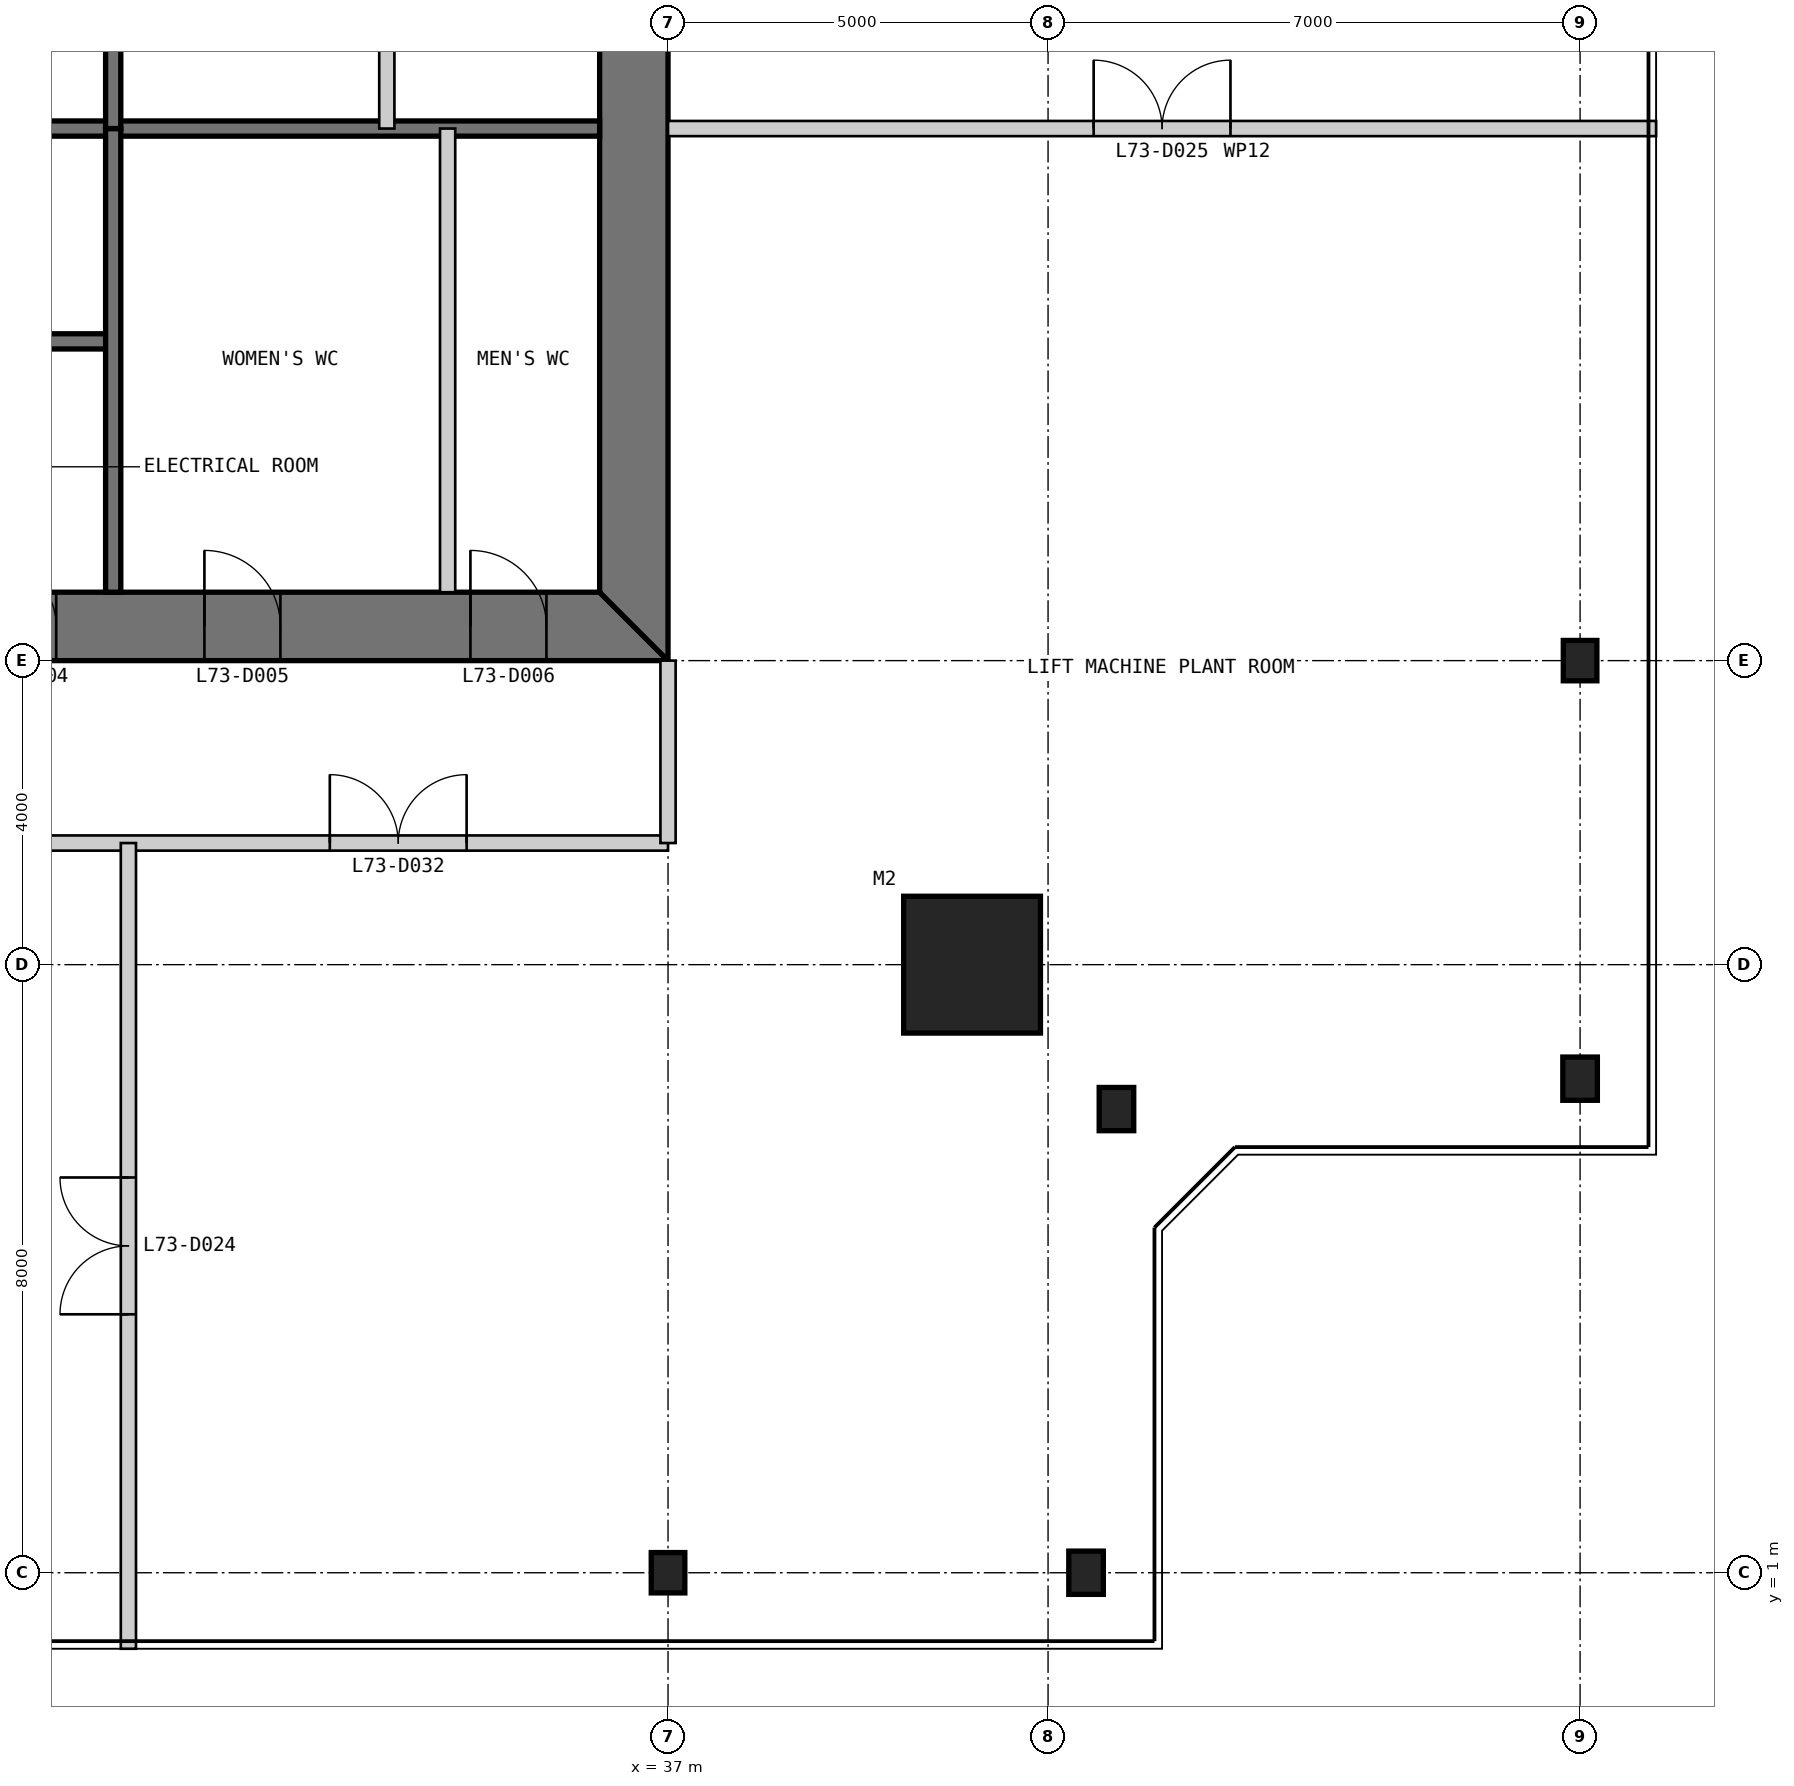
"""IFC4 building model, lengths in metres.
Left out: names, types, materials, properties, quantities, classifications, styles, units other than length and angle.
Written with IfcOpenShell. Run it as: python <this file> out.ifc"""

import sys

from ifc_helpers import new_model, si_unit, direction, frame, frame_2d, origin, origin_2d, place, context, subcontext, project, spatial, polyline, rectangle, i_section, outline, extrude, element, fill, save


model = new_model("IFC4")
c1 = context("Model", 3, precision=1e-05, world=origin(), true_north=direction((0.0, 1.0)))
c2 = subcontext(c1, "Body", "Model", "MODEL_VIEW")
j1 = project(units=[si_unit("LENGTHUNIT", "METRE"), si_unit("PLANEANGLEUNIT", "RADIAN")], contexts=[c1])
p1 = place(None, origin())
s1 = spatial("IfcSite", under=j1, at=p1, CompositionType="ELEMENT")
p2 = place(p1, origin())
s2 = spatial("IfcBuilding", under=s1, at=p2, CompositionType="ELEMENT")
p3 = place(p2, frame((0.0, 0.0, 301.8)))
s3 = spatial("IfcBuildingStorey", under=s2, at=p3, CompositionType="ELEMENT", Elevation=301.8)
p4 = place(p3, frame((41.0, 9.0, 0.0), z_axis=(0.0, 0.0, 1.0), x_axis=(1.0, 0.0, 0.0)))
e1 = element("IfcColumn", 1, at=p4, inside=s3, PredefinedType="COLUMN", context=c2, shape_type="SweptSolid", body=[
    extrude(rectangle(XDim=1.8, YDim=1.8, at=origin_2d()), origin(), (0.0, 0.0, 1.0), 6.0),
])
p5 = place(p3, frame((37.0, 1.0, 0.0), z_axis=(0.0, 0.0, 1.0), x_axis=(1.0, 0.0, 0.0)))
e2 = element("IfcColumn", 2, at=p5, inside=s3, PredefinedType="COLUMN", context=c2, shape_type="SweptSolid", body=[
    extrude(i_section(OverallWidth=0.442, OverallDepth=0.531, WebThickness=0.066, FlangeThickness=0.106, at=origin_2d()), origin(), (0.0, 0.0, 1.0), 6.0),
])
for number, where, z_axis, x_axis in (
    (3, (42.5, 1.0, 0.0), (0.0, 0.0, 1.0), (1.0, 0.0, 0.0)),
    (4, (42.9, 7.1, 0.0), (0.0, 0.0, 1.0), (1.0, 0.0, 0.0)),
    (5, (49.0, 7.5, 0.0), (0.0, 0.0, 1.0), (1.0, 0.0, 0.0)),
):
    element("IfcColumn", number, at=place(p3, frame(where, z_axis=z_axis, x_axis=x_axis)), inside=s3, PredefinedType="COLUMN", context=c2, shape_type="SweptSolid", body=[
        extrude(i_section(OverallWidth=0.455, OverallDepth=0.569, WebThickness=0.078, FlangeThickness=0.125, at=origin_2d()), origin(), (0.0, 0.0, 1.0), 6.0),
    ])
p6 = place(p3, frame((49.0, 13.0, 0.0), z_axis=(0.0, 0.0, 1.0), x_axis=(1.0, 0.0, 0.0)))
e6 = element("IfcColumn", 6, at=p6, inside=s3, PredefinedType="COLUMN", context=c2, shape_type="SweptSolid", body=[
    extrude(i_section(OverallWidth=0.442, OverallDepth=0.531, WebThickness=0.066, FlangeThickness=0.106, at=origin_2d()), origin(), (0.0, 0.0, 1.0), 6.0),
])
p7 = place(p3, frame((13.0, 13.45, 0.0), z_axis=(0.0, 0.0, 1.0), x_axis=(1.0, 0.0, 0.0)))
e7 = element("IfcWall", 7, at=p7, inside=s3, PredefinedType="SHEAR", context=c2, shape_type="SweptSolid", body=[
    extrude(outline(polyline([(0.0, -0.45), (24.0, -0.45), (23.1, 0.45), (0.9, 0.45), (0.0, -0.45)])), origin(), (0.0, 0.0, 1.0), 6.0),
])
p8 = place(p7, frame((4.9, 0.0, 0.0)))
e8 = element("IfcOpeningElement", 8, at=p8, cuts=e7, PredefinedType="OPENING", context=c2, shape_type="SweptSolid", body=[
    extrude(rectangle(XDim=1.0, YDim=2.2, at=frame_2d((0.5, 1.1))), frame((0.0, 0.46, 0.0), z_axis=(0.0, -1.0, 0.0), x_axis=(1.0, 0.0, 0.0)), (0.0, 0.0, 1.0), 0.92),
])
p9 = place(p7, frame((8.9, 0.0, 0.0)))
e9 = element("IfcOpeningElement", 9, at=p9, cuts=e7, PredefinedType="OPENING", context=c2, shape_type="SweptSolid", body=[
    extrude(rectangle(XDim=1.1, YDim=2.2, at=frame_2d((0.55, 1.1))), frame((0.0, 0.46, 0.0), z_axis=(0.0, -1.0, 0.0), x_axis=(1.0, 0.0, 0.0)), (0.0, 0.0, 1.0), 0.92),
])
p10 = place(p7, frame((15.05, 0.0, 0.0)))
e10 = element("IfcOpeningElement", 10, at=p10, cuts=e7, PredefinedType="OPENING", context=c2, shape_type="SweptSolid", body=[
    extrude(rectangle(XDim=0.9, YDim=2.2, at=frame_2d((0.45, 1.1))), frame((0.0, 0.46, 0.0), z_axis=(0.0, -1.0, 0.0), x_axis=(1.0, 0.0, 0.0)), (0.0, 0.0, 1.0), 0.92),
])
p11 = place(p7, frame((17.9, 0.0, 0.0)))
e11 = element("IfcOpeningElement", 11, at=p11, cuts=e7, PredefinedType="OPENING", context=c2, shape_type="SweptSolid", body=[
    extrude(rectangle(XDim=1.0, YDim=2.2, at=frame_2d((0.5, 1.1))), frame((0.0, 0.46, 0.0), z_axis=(0.0, -1.0, 0.0), x_axis=(1.0, 0.0, 0.0)), (0.0, 0.0, 1.0), 0.92),
])
p12 = place(p7, frame((21.4, 0.0, 0.0)))
e12 = element("IfcOpeningElement", 12, at=p12, cuts=e7, PredefinedType="OPENING", context=c2, shape_type="SweptSolid", body=[
    extrude(rectangle(XDim=1.0, YDim=2.2, at=frame_2d((0.5, 1.1))), frame((0.0, 0.46, 0.0), z_axis=(0.0, -1.0, 0.0), x_axis=(1.0, 0.0, 0.0)), (0.0, 0.0, 1.0), 0.92),
])
p13 = place(p3, frame((36.55, 13.9, 0.0), z_axis=(0.0, 0.0, 1.0), x_axis=(0.0, 1.0, 0.0)))
e13 = element("IfcWall", 13, at=p13, inside=s3, PredefinedType="SHEAR", context=c2, shape_type="SweptSolid", body=[
    extrude(outline(polyline([(-0.9, -0.45), (23.1, -0.45), (22.2, 0.45), (0.0, 0.45), (-0.9, -0.45)])), origin(), (0.0, 0.0, 1.0), 6.0),
])
p14 = place(p13, frame((20.2, 0.0, 0.0)))
e14 = element("IfcOpeningElement", 14, at=p14, cuts=e13, PredefinedType="OPENING", context=c2, shape_type="SweptSolid", body=[
    extrude(rectangle(XDim=1.0, YDim=2.2, at=frame_2d((0.5, 1.1))), frame((0.0, 0.46, 0.0), z_axis=(0.0, -1.0, 0.0), x_axis=(1.0, 0.0, 0.0)), (0.0, 0.0, 1.0), 0.92),
])
p15 = place(p13, frame((17.25, 0.0, 0.0)))
e15 = element("IfcOpeningElement", 15, at=p15, cuts=e13, PredefinedType="OPENING", context=c2, shape_type="SweptSolid", body=[
    extrude(rectangle(XDim=0.9, YDim=2.2, at=frame_2d((0.45, 1.1))), frame((0.0, 0.46, 0.0), z_axis=(0.0, -1.0, 0.0), x_axis=(1.0, 0.0, 0.0)), (0.0, 0.0, 1.0), 0.92),
])
p16 = place(p3, frame((20.3, 17.2, 0.0), z_axis=(0.0, 0.0, 1.0), x_axis=(1.0, 0.0, 0.0)))
e16 = element("IfcWall", 16, at=p16, inside=s3, PredefinedType="SOLIDWALL", context=c2, shape_type="SweptSolid", body=[
    extrude(rectangle(XDim=9.4, YDim=0.2, at=frame_2d((4.7, 0.0))), origin(), (0.0, 0.0, 1.0), 5.8),
])
p17 = place(p16, frame((0.25, 0.0, 0.0)))
e17 = element("IfcOpeningElement", 17, at=p17, cuts=e16, PredefinedType="OPENING", context=c2, shape_type="SweptSolid", body=[
    extrude(rectangle(XDim=1.0, YDim=2.2, at=frame_2d((0.5, 1.1))), frame((0.0, 0.11, 0.0), z_axis=(0.0, -1.0, 0.0), x_axis=(1.0, 0.0, 0.0)), (0.0, 0.0, 1.0), 0.22),
])
p18 = place(p3, frame((20.3, 20.0, 0.0), z_axis=(0.0, 0.0, 1.0), x_axis=(1.0, 0.0, 0.0)))
e18 = element("IfcWall", 18, at=p18, inside=s3, PredefinedType="SOLIDWALL", context=c2, shape_type="SweptSolid", body=[
    extrude(rectangle(XDim=15.8, YDim=0.2, at=frame_2d((7.9, 0.0))), origin(), (0.0, 0.0, 1.0), 5.8),
])
p19 = place(p3, frame((29.7, 13.9, 0.0), z_axis=(0.0, 0.0, 1.0), x_axis=(0.0, 1.0, 0.0)))
e19 = element("IfcWall", 19, at=p19, inside=s3, PredefinedType="SOLIDWALL", context=c2, shape_type="SweptSolid", body=[
    extrude(rectangle(XDim=6.1, YDim=0.2, at=frame_2d((3.05, 0.0))), origin(), (0.0, 0.0, 1.0), 5.8),
])
p20 = place(p3, frame((34.1, 13.9, 0.0), z_axis=(0.0, 0.0, 1.0), x_axis=(0.0, 1.0, 0.0)))
e20 = element("IfcWall", 20, at=p20, inside=s3, PredefinedType="PARTITIONING", context=c2, shape_type="SweptSolid", body=[
    extrude(rectangle(XDim=6.1, YDim=0.2, at=frame_2d((3.05, 0.0))), origin(), (0.0, 0.0, 1.0), 5.8),
])
p21 = place(p3, frame((33.3, 36.1, 0.0), z_axis=(0.0, 0.0, 1.0), x_axis=(0.0, -1.0, 0.0)))
e21 = element("IfcWall", 21, at=p21, inside=s3, PredefinedType="PARTITIONING", context=c2, shape_type="SweptSolid", body=[
    extrude(rectangle(XDim=16.1, YDim=0.2, at=frame_2d((8.05, 0.0))), origin(), (0.0, 0.0, 1.0), 5.8),
])
p22 = place(p3, frame((29.7, 36.1, 0.0), z_axis=(0.0, 0.0, 1.0), x_axis=(0.0, -1.0, 0.0)))
e22 = element("IfcWall", 22, at=p22, inside=s3, PredefinedType="SOLIDWALL", context=c2, shape_type="SweptSolid", body=[
    extrude(rectangle(XDim=16.1, YDim=0.2, at=frame_2d((8.05, 0.0))), origin(), (0.0, 0.0, 1.0), 5.8),
])
p23 = place(p22, frame((6.4, 0.0, 0.0)))
e23 = element("IfcOpeningElement", 23, at=p23, cuts=e22, PredefinedType="OPENING", context=c2, shape_type="SweptSolid", body=[
    extrude(rectangle(XDim=0.9, YDim=2.2, at=frame_2d((0.45, 1.1))), frame((0.0, 0.11, 0.0), z_axis=(0.0, -1.0, 0.0), x_axis=(1.0, 0.0, 0.0)), (0.0, 0.0, 1.0), 0.22),
])
p24 = place(p22, frame((11.4, 0.0, 0.0)))
e24 = element("IfcOpeningElement", 24, at=p24, cuts=e22, PredefinedType="OPENING", context=c2, shape_type="SweptSolid", body=[
    extrude(rectangle(XDim=0.9, YDim=2.2, at=frame_2d((0.45, 1.1))), frame((0.0, 0.11, 0.0), z_axis=(0.0, -1.0, 0.0), x_axis=(1.0, 0.0, 0.0)), (0.0, 0.0, 1.0), 0.22),
])
p25 = place(p3, frame((13.0, 10.6, 0.0), z_axis=(0.0, 0.0, 1.0), x_axis=(1.0, 0.0, 0.0)))
e25 = element("IfcWall", 25, at=p25, inside=s3, PredefinedType="PARTITIONING", context=c2, shape_type="SweptSolid", body=[
    extrude(rectangle(XDim=24.0, YDim=0.2, at=frame_2d((12.0, 0.0))), origin(), (0.0, 0.0, 1.0), 5.8),
])
p26 = place(p25, frame((2.8, 0.0, 0.0)))
e26 = element("IfcOpeningElement", 26, at=p26, cuts=e25, PredefinedType="OPENING", context=c2, shape_type="SweptSolid", body=[
    extrude(rectangle(XDim=1.8, YDim=2.4, at=frame_2d((0.9, 1.2))), frame((0.0, 0.11, 0.0), z_axis=(0.0, -1.0, 0.0), x_axis=(1.0, 0.0, 0.0)), (0.0, 0.0, 1.0), 0.22),
])
p27 = place(p25, frame((11.25, 0.0, 0.0)))
e27 = element("IfcOpeningElement", 27, at=p27, cuts=e25, PredefinedType="OPENING", context=c2, shape_type="SweptSolid", body=[
    extrude(rectangle(XDim=1.8, YDim=2.4, at=frame_2d((0.9, 1.2))), frame((0.0, 0.11, 0.0), z_axis=(0.0, -1.0, 0.0), x_axis=(1.0, 0.0, 0.0)), (0.0, 0.0, 1.0), 0.22),
])
p28 = place(p25, frame((19.55, 0.0, 0.0)))
e28 = element("IfcOpeningElement", 28, at=p28, cuts=e25, PredefinedType="OPENING", context=c2, shape_type="SweptSolid", body=[
    extrude(rectangle(XDim=1.8, YDim=2.4, at=frame_2d((0.9, 1.2))), frame((0.0, 0.11, 0.0), z_axis=(0.0, -1.0, 0.0), x_axis=(1.0, 0.0, 0.0)), (0.0, 0.0, 1.0), 0.22),
])
p29 = place(p3, frame((37.0, 10.6, 0.0), z_axis=(0.0, 0.0, 1.0), x_axis=(0.0, 1.0, 0.0)))
e29 = element("IfcWall", 29, at=p29, inside=s3, PredefinedType="PARTITIONING", context=c2, shape_type="SweptSolid", body=[
    extrude(rectangle(XDim=2.4, YDim=0.2, at=frame_2d((1.2, 0.0))), origin(), (0.0, 0.0, 1.0), 4.853),
])
p30 = place(p3, frame((29.9, 0.0, 0.0), z_axis=(0.0, 0.0, 1.0), x_axis=(0.0, 1.0, 0.0)))
e30 = element("IfcWall", 30, at=p30, inside=s3, PredefinedType="PARTITIONING", context=c2, shape_type="SweptSolid", body=[
    extrude(rectangle(XDim=10.6, YDim=0.2, at=frame_2d((5.3, 0.0))), origin(), (0.0, 0.0, 1.0), 5.8),
])
p31 = place(p30, frame((4.4, 0.0, 0.0)))
e31 = element("IfcOpeningElement", 31, at=p31, cuts=e30, PredefinedType="OPENING", context=c2, shape_type="SweptSolid", body=[
    extrude(rectangle(XDim=1.8, YDim=2.4, at=frame_2d((0.9, 1.2))), frame((0.0, 0.11, 0.0), z_axis=(0.0, -1.0, 0.0), x_axis=(1.0, 0.0, 0.0)), (0.0, 0.0, 1.0), 0.22),
])
p32 = place(p3, frame((37.0, 20.0, 0.0), z_axis=(0.0, 0.0, 1.0), x_axis=(1.0, 0.0, 0.0)))
e32 = element("IfcWall", 32, at=p32, inside=s3, PredefinedType="PARTITIONING", context=c2, shape_type="SweptSolid", body=[
    extrude(rectangle(XDim=13.0, YDim=0.2, at=frame_2d((6.5, 0.0))), origin(), (0.0, 0.0, 1.0), 5.8),
])
p33 = place(p32, frame((5.6, 0.0, 0.0)))
e33 = element("IfcOpeningElement", 33, at=p33, cuts=e32, PredefinedType="OPENING", context=c2, shape_type="SweptSolid", body=[
    extrude(rectangle(XDim=1.8, YDim=2.4, at=frame_2d((0.9, 1.2))), frame((0.0, 0.11, 0.0), z_axis=(0.0, -1.0, 0.0), x_axis=(1.0, 0.0, 0.0)), (0.0, 0.0, 1.0), 0.22),
])
p34 = place(p10, origin())
e34 = element("IfcDoor", 34, at=p34, inside=s3, OperationType="SINGLE_SWING_LEFT", PredefinedType="DOOR", context=c2, shape_type="SweptSolid", body=[
    extrude(rectangle(XDim=0.9, YDim=2.2, at=frame_2d((0.45, 1.1))), frame((0.0, 0.025, 0.0), z_axis=(0.0, -1.0, 0.0), x_axis=(1.0, 0.0, 0.0)), (0.0, 0.0, 1.0), 0.05),
    extrude(outline(polyline([(0.0, 0.0), (0.04, 0.0), (0.04, 2.16), (0.86, 2.16), (0.86, 0.0), (0.9, 0.0), (0.9, 2.2), (0.0, 2.2), (0.0, 0.0)])), frame((0.0, 0.3, 0.0), z_axis=(0.0, -1.0, 0.0), x_axis=(1.0, 0.0, 0.0)), (0.0, 0.0, 1.0), 0.6),
])
fill(e10, e34)
p35 = place(p11, origin())
e35 = element("IfcDoor", 35, at=p35, inside=s3, OperationType="SINGLE_SWING_LEFT", PredefinedType="DOOR", context=c2, shape_type="SweptSolid", body=[
    extrude(rectangle(XDim=1.0, YDim=2.2, at=frame_2d((0.5, 1.1))), frame((0.0, 0.025, 0.0), z_axis=(0.0, -1.0, 0.0), x_axis=(1.0, 0.0, 0.0)), (0.0, 0.0, 1.0), 0.05),
    extrude(outline(polyline([(0.0, 0.0), (0.04, 0.0), (0.04, 2.16), (0.96, 2.16), (0.96, 0.0), (1.0, 0.0), (1.0, 2.2), (0.0, 2.2), (0.0, 0.0)])), frame((0.0, 0.3, 0.0), z_axis=(0.0, -1.0, 0.0), x_axis=(1.0, 0.0, 0.0)), (0.0, 0.0, 1.0), 0.6),
])
fill(e11, e35)
p36 = place(p12, origin())
e36 = element("IfcDoor", 36, at=p36, inside=s3, OperationType="SINGLE_SWING_LEFT", PredefinedType="DOOR", context=c2, shape_type="SweptSolid", body=[
    extrude(rectangle(XDim=1.0, YDim=2.2, at=frame_2d((0.5, 1.1))), frame((0.0, 0.025, 0.0), z_axis=(0.0, -1.0, 0.0), x_axis=(1.0, 0.0, 0.0)), (0.0, 0.0, 1.0), 0.05),
    extrude(outline(polyline([(0.0, 0.0), (0.04, 0.0), (0.04, 2.16), (0.96, 2.16), (0.96, 0.0), (1.0, 0.0), (1.0, 2.2), (0.0, 2.2), (0.0, 0.0)])), frame((0.0, 0.3, 0.0), z_axis=(0.0, -1.0, 0.0), x_axis=(1.0, 0.0, 0.0)), (0.0, 0.0, 1.0), 0.6),
])
fill(e12, e36)
p37 = place(p31, origin())
e37 = element("IfcDoor", 37, at=p37, inside=s3, OperationType="DOUBLE_DOOR_SINGLE_SWING", PredefinedType="DOOR", context=c2, shape_type="SweptSolid", body=[
    extrude(rectangle(XDim=1.8, YDim=2.4, at=frame_2d((0.9, 1.2))), frame((0.0, 0.025, 0.0), z_axis=(0.0, -1.0, 0.0), x_axis=(1.0, 0.0, 0.0)), (0.0, 0.0, 1.0), 0.05),
])
fill(e31, e37)
p38 = place(p33, origin())
e38 = element("IfcDoor", 38, at=p38, inside=s3, OperationType="DOUBLE_DOOR_SINGLE_SWING", PredefinedType="DOOR", context=c2, shape_type="SweptSolid", body=[
    extrude(rectangle(XDim=1.8, YDim=2.4, at=frame_2d((0.9, 1.2))), frame((0.0, 0.025, 0.0), z_axis=(0.0, -1.0, 0.0), x_axis=(1.0, 0.0, 0.0)), (0.0, 0.0, 1.0), 0.05),
])
fill(e33, e38)
p39 = place(p28, origin())
e39 = element("IfcDoor", 39, at=p39, inside=s3, OperationType="DOUBLE_DOOR_SINGLE_SWING", PredefinedType="DOOR", context=c2, shape_type="SweptSolid", body=[
    extrude(rectangle(XDim=1.8, YDim=2.4, at=frame_2d((0.9, 1.2))), frame((0.0, 0.025, 0.0), z_axis=(0.0, -1.0, 0.0), x_axis=(1.0, 0.0, 0.0)), (0.0, 0.0, 1.0), 0.05),
])
fill(e28, e39)
save(model, sys.argv[1])
